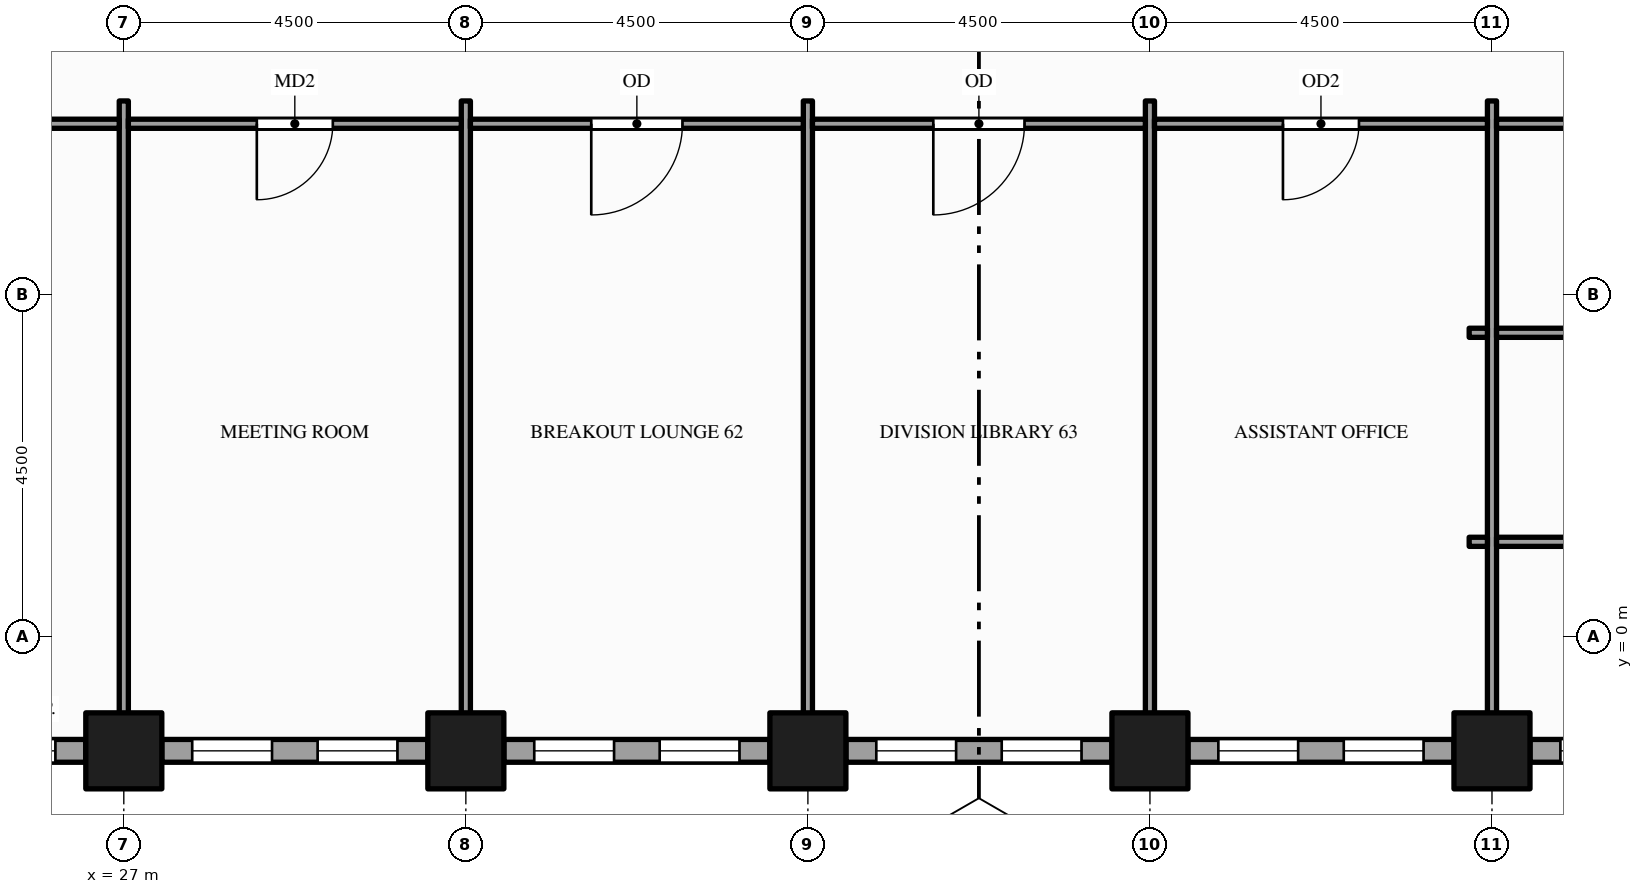
"""IFC4 building model, lengths in metres.
Left out: names, types, materials, properties, quantities, classifications, styles, units other than length and angle.
Written with IfcOpenShell. Run it as: python <this file> out.ifc"""

import sys

from ifc_helpers import new_model, si_unit, direction, frame, frame_2d, origin, origin_2d, place, context, subcontext, project, spatial, rectangle, hollow_rectangle, extrude, element, fill, save


model = new_model("IFC4")
c1 = context("Model", 3, precision=1e-05, world=origin(), true_north=direction((0.0, 1.0)))
c2 = subcontext(c1, "Body", "Model", "MODEL_VIEW")
j1 = project(units=[si_unit("LENGTHUNIT", "METRE"), si_unit("PLANEANGLEUNIT", "RADIAN")], contexts=[c1])
p1 = place(None, origin())
s1 = spatial("IfcSite", under=j1, at=p1, CompositionType="ELEMENT")
p2 = place(p1, origin())
s2 = spatial("IfcBuilding", under=s1, at=p2, CompositionType="ELEMENT")
p3 = place(p2, frame((0.0, 0.0, 103.0)))
s3 = spatial("IfcBuildingStorey", under=s2, at=p3, CompositionType="ELEMENT", Elevation=103.0)
for number, where, z_axis, x_axis in (
    (1, (27.0, -1.5, -0.15), (0.0, 0.0, 1.0), (1.0, 0.0, 0.0)),
    (2, (31.5, -1.5, -0.15), (0.0, 0.0, 1.0), (1.0, 0.0, 0.0)),
    (3, (36.0, -1.5, -0.15), (0.0, 0.0, 1.0), (1.0, 0.0, 0.0)),
    (4, (40.5, -1.5, -0.15), (0.0, 0.0, 1.0), (1.0, 0.0, 0.0)),
    (5, (45.0, -1.5, -0.15), (0.0, 0.0, 1.0), (1.0, 0.0, 0.0)),
):
    element("IfcColumn", number, at=place(p3, frame(where, z_axis=z_axis, x_axis=x_axis)), inside=s3, PredefinedType="COLUMN", context=c2, shape_type="SweptSolid", body=[
        extrude(hollow_rectangle(XDim=1.0, YDim=1.0, WallThickness=0.05, at=origin_2d()), origin(), (0.0, 0.0, 1.0), 4.0),
    ])
p4 = place(p3, frame((23.0, -1.5, 0.0), z_axis=(0.0, 0.0, 1.0), x_axis=(1.0, 0.0, 0.0)))
e6 = element("IfcWall", 6, at=p4, inside=s3, PredefinedType="STANDARD", context=c2, shape_type="SweptSolid", body=[
    extrude(rectangle(XDim=3.5, YDim=0.3, at=frame_2d((1.75, 0.0))), origin(), (0.0, 0.0, 1.0), 3.154),
])
p5 = place(p4, frame((0.4, 0.0, 0.9)))
e7 = element("IfcOpeningElement", 7, at=p5, cuts=e6, PredefinedType="OPENING", context=c2, shape_type="SweptSolid", body=[
    extrude(rectangle(XDim=1.05, YDim=2.0, at=frame_2d((0.525, 1.0))), frame((0.0, 0.16, 0.0), z_axis=(0.0, -1.0, 0.0), x_axis=(1.0, 0.0, 0.0)), (0.0, 0.0, 1.0), 0.32),
])
p6 = place(p4, frame((2.05, 0.0, 0.9)))
e8 = element("IfcOpeningElement", 8, at=p6, cuts=e6, PredefinedType="OPENING", context=c2, shape_type="SweptSolid", body=[
    extrude(rectangle(XDim=1.05, YDim=2.0, at=frame_2d((0.525, 1.0))), frame((0.0, 0.16, 0.0), z_axis=(0.0, -1.0, 0.0), x_axis=(1.0, 0.0, 0.0)), (0.0, 0.0, 1.0), 0.32),
])
p7 = place(p3, frame((27.5, -1.5, 0.0), z_axis=(0.0, 0.0, 1.0), x_axis=(1.0, 0.0, 0.0)))
e9 = element("IfcWall", 9, at=p7, inside=s3, PredefinedType="STANDARD", context=c2, shape_type="SweptSolid", body=[
    extrude(rectangle(XDim=3.5, YDim=0.3, at=frame_2d((1.75, 0.0))), origin(), (0.0, 0.0, 1.0), 3.154),
])
p8 = place(p7, frame((0.4, 0.0, 0.9)))
e10 = element("IfcOpeningElement", 10, at=p8, cuts=e9, PredefinedType="OPENING", context=c2, shape_type="SweptSolid", body=[
    extrude(rectangle(XDim=1.05, YDim=2.0, at=frame_2d((0.525, 1.0))), frame((0.0, 0.16, 0.0), z_axis=(0.0, -1.0, 0.0), x_axis=(1.0, 0.0, 0.0)), (0.0, 0.0, 1.0), 0.32),
])
p9 = place(p7, frame((2.05, 0.0, 0.9)))
e11 = element("IfcOpeningElement", 11, at=p9, cuts=e9, PredefinedType="OPENING", context=c2, shape_type="SweptSolid", body=[
    extrude(rectangle(XDim=1.05, YDim=2.0, at=frame_2d((0.525, 1.0))), frame((0.0, 0.16, 0.0), z_axis=(0.0, -1.0, 0.0), x_axis=(1.0, 0.0, 0.0)), (0.0, 0.0, 1.0), 0.32),
])
p10 = place(p3, frame((32.0, -1.5, 0.0), z_axis=(0.0, 0.0, 1.0), x_axis=(1.0, 0.0, 0.0)))
e12 = element("IfcWall", 12, at=p10, inside=s3, PredefinedType="STANDARD", context=c2, shape_type="SweptSolid", body=[
    extrude(rectangle(XDim=3.5, YDim=0.3, at=frame_2d((1.75, 0.0))), origin(), (0.0, 0.0, 1.0), 3.154),
])
p11 = place(p10, frame((0.4, 0.0, 0.9)))
e13 = element("IfcOpeningElement", 13, at=p11, cuts=e12, PredefinedType="OPENING", context=c2, shape_type="SweptSolid", body=[
    extrude(rectangle(XDim=1.05, YDim=2.0, at=frame_2d((0.525, 1.0))), frame((0.0, 0.16, 0.0), z_axis=(0.0, -1.0, 0.0), x_axis=(1.0, 0.0, 0.0)), (0.0, 0.0, 1.0), 0.32),
])
p12 = place(p10, frame((2.05, 0.0, 0.9)))
e14 = element("IfcOpeningElement", 14, at=p12, cuts=e12, PredefinedType="OPENING", context=c2, shape_type="SweptSolid", body=[
    extrude(rectangle(XDim=1.05, YDim=2.0, at=frame_2d((0.525, 1.0))), frame((0.0, 0.16, 0.0), z_axis=(0.0, -1.0, 0.0), x_axis=(1.0, 0.0, 0.0)), (0.0, 0.0, 1.0), 0.32),
])
p13 = place(p3, frame((36.5, -1.5, 0.0), z_axis=(0.0, 0.0, 1.0), x_axis=(1.0, 0.0, 0.0)))
e15 = element("IfcWall", 15, at=p13, inside=s3, PredefinedType="STANDARD", context=c2, shape_type="SweptSolid", body=[
    extrude(rectangle(XDim=3.5, YDim=0.3, at=frame_2d((1.75, 0.0))), origin(), (0.0, 0.0, 1.0), 3.154),
])
p14 = place(p13, frame((0.4, 0.0, 0.9)))
e16 = element("IfcOpeningElement", 16, at=p14, cuts=e15, PredefinedType="OPENING", context=c2, shape_type="SweptSolid", body=[
    extrude(rectangle(XDim=1.05, YDim=2.0, at=frame_2d((0.525, 1.0))), frame((0.0, 0.16, 0.0), z_axis=(0.0, -1.0, 0.0), x_axis=(1.0, 0.0, 0.0)), (0.0, 0.0, 1.0), 0.32),
])
p15 = place(p13, frame((2.05, 0.0, 0.9)))
e17 = element("IfcOpeningElement", 17, at=p15, cuts=e15, PredefinedType="OPENING", context=c2, shape_type="SweptSolid", body=[
    extrude(rectangle(XDim=1.05, YDim=2.0, at=frame_2d((0.525, 1.0))), frame((0.0, 0.16, 0.0), z_axis=(0.0, -1.0, 0.0), x_axis=(1.0, 0.0, 0.0)), (0.0, 0.0, 1.0), 0.32),
])
p16 = place(p3, frame((41.0, -1.5, 0.0), z_axis=(0.0, 0.0, 1.0), x_axis=(1.0, 0.0, 0.0)))
e18 = element("IfcWall", 18, at=p16, inside=s3, PredefinedType="STANDARD", context=c2, shape_type="SweptSolid", body=[
    extrude(rectangle(XDim=3.5, YDim=0.3, at=frame_2d((1.75, 0.0))), origin(), (0.0, 0.0, 1.0), 3.154),
])
p17 = place(p16, frame((0.4, 0.0, 0.9)))
e19 = element("IfcOpeningElement", 19, at=p17, cuts=e18, PredefinedType="OPENING", context=c2, shape_type="SweptSolid", body=[
    extrude(rectangle(XDim=1.05, YDim=2.0, at=frame_2d((0.525, 1.0))), frame((0.0, 0.16, 0.0), z_axis=(0.0, -1.0, 0.0), x_axis=(1.0, 0.0, 0.0)), (0.0, 0.0, 1.0), 0.32),
])
p18 = place(p16, frame((2.05, 0.0, 0.9)))
e20 = element("IfcOpeningElement", 20, at=p18, cuts=e18, PredefinedType="OPENING", context=c2, shape_type="SweptSolid", body=[
    extrude(rectangle(XDim=1.05, YDim=2.0, at=frame_2d((0.525, 1.0))), frame((0.0, 0.16, 0.0), z_axis=(0.0, -1.0, 0.0), x_axis=(1.0, 0.0, 0.0)), (0.0, 0.0, 1.0), 0.32),
])
p19 = place(p3, frame((45.5, -1.5, 0.0), z_axis=(0.0, 0.0, 1.0), x_axis=(1.0, 0.0, 0.0)))
e21 = element("IfcWall", 21, at=p19, inside=s3, PredefinedType="STANDARD", context=c2, shape_type="SweptSolid", body=[
    extrude(rectangle(XDim=3.5, YDim=0.3, at=frame_2d((1.75, 0.0))), origin(), (0.0, 0.0, 1.0), 3.154),
])
p20 = place(p19, frame((0.4, 0.0, 0.9)))
e22 = element("IfcOpeningElement", 22, at=p20, cuts=e21, PredefinedType="OPENING", context=c2, shape_type="SweptSolid", body=[
    extrude(rectangle(XDim=1.05, YDim=2.0, at=frame_2d((0.525, 1.0))), frame((0.0, 0.16, 0.0), z_axis=(0.0, -1.0, 0.0), x_axis=(1.0, 0.0, 0.0)), (0.0, 0.0, 1.0), 0.32),
])
p21 = place(p19, frame((2.05, 0.0, 0.9)))
e23 = element("IfcOpeningElement", 23, at=p21, cuts=e21, PredefinedType="OPENING", context=c2, shape_type="SweptSolid", body=[
    extrude(rectangle(XDim=1.05, YDim=2.0, at=frame_2d((0.525, 1.0))), frame((0.0, 0.16, 0.0), z_axis=(0.0, -1.0, 0.0), x_axis=(1.0, 0.0, 0.0)), (0.0, 0.0, 1.0), 0.32),
])
for number, where, z_axis, x_axis in (
    (24, (27.0, -1.35, 0.0), (0.0, 0.0, 1.0), (0.0, 1.0, 0.0)),
    (25, (31.5, -1.35, 0.0), (0.0, 0.0, 1.0), (0.0, 1.0, 0.0)),
    (26, (36.0, -1.35, 0.0), (0.0, 0.0, 1.0), (0.0, 1.0, 0.0)),
    (27, (40.5, -1.35, 0.0), (0.0, 0.0, 1.0), (0.0, 1.0, 0.0)),
    (28, (45.0, -1.35, 0.0), (0.0, 0.0, 1.0), (0.0, 1.0, 0.0)),
):
    element("IfcWall", number, at=place(p3, frame(where, z_axis=z_axis, x_axis=x_axis)), inside=s3, PredefinedType="PARTITIONING", context=c2, shape_type="SweptSolid", body=[
        extrude(rectangle(XDim=8.4, YDim=0.12, at=frame_2d((4.2, 0.0))), origin(), (0.0, 0.0, 1.0), 2.938),
    ])
p22 = place(p3, frame((44.7, 1.25, 0.0), z_axis=(0.0, 0.0, 1.0), x_axis=(1.0, 0.0, 0.0)))
e29 = element("IfcWall", 29, at=p22, inside=s3, PredefinedType="PARTITIONING", context=c2, shape_type="SweptSolid", body=[
    extrude(rectangle(XDim=0.24, YDim=0.12, at=frame_2d((0.12, 0.0))), origin(), (0.0, 0.0, 1.0), 2.938),
])
p23 = place(p3, frame((45.06, 1.25, 0.0), z_axis=(0.0, 0.0, 1.0), x_axis=(1.0, 0.0, 0.0)))
e30 = element("IfcWall", 30, at=p23, inside=s3, PredefinedType="PARTITIONING", context=c2, shape_type="SweptSolid", body=[
    extrude(rectangle(XDim=4.38, YDim=0.12, at=frame_2d((2.19, 0.0))), origin(), (0.0, 0.0, 1.0), 2.938),
])
p24 = place(p3, frame((44.7, 4.0, 0.0), z_axis=(0.0, 0.0, 1.0), x_axis=(1.0, 0.0, 0.0)))
e31 = element("IfcWall", 31, at=p24, inside=s3, PredefinedType="PARTITIONING", context=c2, shape_type="SweptSolid", body=[
    extrude(rectangle(XDim=0.24, YDim=0.12, at=frame_2d((0.12, 0.0))), origin(), (0.0, 0.0, 1.0), 2.938),
])
p25 = place(p3, frame((45.06, 4.0, 0.0), z_axis=(0.0, 0.0, 1.0), x_axis=(1.0, 0.0, 0.0)))
e32 = element("IfcWall", 32, at=p25, inside=s3, PredefinedType="PARTITIONING", context=c2, shape_type="SweptSolid", body=[
    extrude(rectangle(XDim=4.38, YDim=0.12, at=frame_2d((2.19, 0.0))), origin(), (0.0, 0.0, 1.0), 2.938),
])
p26 = place(p3, frame((22.56, 6.75, 0.0), z_axis=(0.0, 0.0, 1.0), x_axis=(1.0, 0.0, 0.0)))
e33 = element("IfcWall", 33, at=p26, inside=s3, PredefinedType="PARTITIONING", context=c2, shape_type="SweptSolid", body=[
    extrude(rectangle(XDim=4.38, YDim=0.12, at=frame_2d((2.19, 0.0))), origin(), (0.0, 0.0, 1.0), 2.76),
])
p27 = place(p26, frame((1.69, 0.0, 0.0)))
e34 = element("IfcOpeningElement", 34, at=p27, cuts=e33, PredefinedType="OPENING", context=c2, shape_type="SweptSolid", body=[
    extrude(rectangle(XDim=1.0, YDim=2.1, at=frame_2d((0.5, 1.05))), frame((0.0, 0.07, 0.0), z_axis=(0.0, -1.0, 0.0), x_axis=(1.0, 0.0, 0.0)), (0.0, 0.0, 1.0), 0.14),
])
p28 = place(p3, frame((27.06, 6.75, 0.0), z_axis=(0.0, 0.0, 1.0), x_axis=(1.0, 0.0, 0.0)))
e35 = element("IfcWall", 35, at=p28, inside=s3, PredefinedType="PARTITIONING", context=c2, shape_type="SweptSolid", body=[
    extrude(rectangle(XDim=4.38, YDim=0.12, at=frame_2d((2.19, 0.0))), origin(), (0.0, 0.0, 1.0), 2.938),
])
p29 = place(p28, frame((1.69, 0.0, 0.0)))
e36 = element("IfcOpeningElement", 36, at=p29, cuts=e35, PredefinedType="OPENING", context=c2, shape_type="SweptSolid", body=[
    extrude(rectangle(XDim=1.0, YDim=2.1, at=frame_2d((0.5, 1.05))), frame((0.0, 0.07, 0.0), z_axis=(0.0, -1.0, 0.0), x_axis=(1.0, 0.0, 0.0)), (0.0, 0.0, 1.0), 0.14),
])
p30 = place(p3, frame((31.56, 6.75, 0.0), z_axis=(0.0, 0.0, 1.0), x_axis=(1.0, 0.0, 0.0)))
e37 = element("IfcWall", 37, at=p30, inside=s3, PredefinedType="PARTITIONING", context=c2, shape_type="SweptSolid", body=[
    extrude(rectangle(XDim=4.38, YDim=0.12, at=frame_2d((2.19, 0.0))), origin(), (0.0, 0.0, 1.0), 2.938),
])
p31 = place(p30, frame((1.59, 0.0, 0.0)))
e38 = element("IfcOpeningElement", 38, at=p31, cuts=e37, PredefinedType="OPENING", context=c2, shape_type="SweptSolid", body=[
    extrude(rectangle(XDim=1.2, YDim=2.1, at=frame_2d((0.6, 1.05))), frame((0.0, 0.07, 0.0), z_axis=(0.0, -1.0, 0.0), x_axis=(1.0, 0.0, 0.0)), (0.0, 0.0, 1.0), 0.14),
])
p32 = place(p3, frame((36.06, 6.75, 0.0), z_axis=(0.0, 0.0, 1.0), x_axis=(1.0, 0.0, 0.0)))
e39 = element("IfcWall", 39, at=p32, inside=s3, PredefinedType="PARTITIONING", context=c2, shape_type="SweptSolid", body=[
    extrude(rectangle(XDim=4.38, YDim=0.12, at=frame_2d((2.19, 0.0))), origin(), (0.0, 0.0, 1.0), 2.938),
])
p33 = place(p32, frame((1.59, 0.0, 0.0)))
e40 = element("IfcOpeningElement", 40, at=p33, cuts=e39, PredefinedType="OPENING", context=c2, shape_type="SweptSolid", body=[
    extrude(rectangle(XDim=1.2, YDim=2.1, at=frame_2d((0.6, 1.05))), frame((0.0, 0.07, 0.0), z_axis=(0.0, -1.0, 0.0), x_axis=(1.0, 0.0, 0.0)), (0.0, 0.0, 1.0), 0.14),
])
p34 = place(p3, frame((40.56, 6.75, 0.0), z_axis=(0.0, 0.0, 1.0), x_axis=(1.0, 0.0, 0.0)))
e41 = element("IfcWall", 41, at=p34, inside=s3, PredefinedType="PARTITIONING", context=c2, shape_type="SweptSolid", body=[
    extrude(rectangle(XDim=4.38, YDim=0.12, at=frame_2d((2.19, 0.0))), origin(), (0.0, 0.0, 1.0), 2.938),
])
p35 = place(p34, frame((1.69, 0.0, 0.0)))
e42 = element("IfcOpeningElement", 42, at=p35, cuts=e41, PredefinedType="OPENING", context=c2, shape_type="SweptSolid", body=[
    extrude(rectangle(XDim=1.0, YDim=2.1, at=frame_2d((0.5, 1.05))), frame((0.0, 0.07, 0.0), z_axis=(0.0, -1.0, 0.0), x_axis=(1.0, 0.0, 0.0)), (0.0, 0.0, 1.0), 0.14),
])
p36 = place(p3, frame((45.06, 6.75, 0.0), z_axis=(0.0, 0.0, 1.0), x_axis=(1.0, 0.0, 0.0)))
e43 = element("IfcWall", 43, at=p36, inside=s3, PredefinedType="PARTITIONING", context=c2, shape_type="SweptSolid", body=[
    extrude(rectangle(XDim=4.38, YDim=0.12, at=frame_2d((2.19, 0.0))), origin(), (0.0, 0.0, 1.0), 2.938),
])
p37 = place(p6, origin())
e44 = element("IfcWindow", 44, at=p37, inside=s3, PartitioningType="SINGLE_PANEL", PredefinedType="WINDOW", context=c2, shape_type="SweptSolid", body=[
    extrude(rectangle(XDim=1.05, YDim=2.0, at=frame_2d((0.525, 1.0))), frame((0.0, 0.03, 0.0), z_axis=(0.0, -1.0, 0.0), x_axis=(1.0, 0.0, 0.0)), (0.0, 0.0, 1.0), 0.06),
])
fill(e8, e44)
p38 = place(p8, origin())
e45 = element("IfcWindow", 45, at=p38, inside=s3, PartitioningType="SINGLE_PANEL", PredefinedType="WINDOW", context=c2, shape_type="SweptSolid", body=[
    extrude(rectangle(XDim=1.05, YDim=2.0, at=frame_2d((0.525, 1.0))), frame((0.0, 0.03, 0.0), z_axis=(0.0, -1.0, 0.0), x_axis=(1.0, 0.0, 0.0)), (0.0, 0.0, 1.0), 0.06),
])
fill(e10, e45)
p39 = place(p9, origin())
e46 = element("IfcWindow", 46, at=p39, inside=s3, PartitioningType="SINGLE_PANEL", PredefinedType="WINDOW", context=c2, shape_type="SweptSolid", body=[
    extrude(rectangle(XDim=1.05, YDim=2.0, at=frame_2d((0.525, 1.0))), frame((0.0, 0.03, 0.0), z_axis=(0.0, -1.0, 0.0), x_axis=(1.0, 0.0, 0.0)), (0.0, 0.0, 1.0), 0.06),
])
fill(e11, e46)
p40 = place(p11, origin())
e47 = element("IfcWindow", 47, at=p40, inside=s3, PartitioningType="SINGLE_PANEL", PredefinedType="WINDOW", context=c2, shape_type="SweptSolid", body=[
    extrude(rectangle(XDim=1.05, YDim=2.0, at=frame_2d((0.525, 1.0))), frame((0.0, 0.03, 0.0), z_axis=(0.0, -1.0, 0.0), x_axis=(1.0, 0.0, 0.0)), (0.0, 0.0, 1.0), 0.06),
])
fill(e13, e47)
p41 = place(p12, origin())
e48 = element("IfcWindow", 48, at=p41, inside=s3, PartitioningType="SINGLE_PANEL", PredefinedType="WINDOW", context=c2, shape_type="SweptSolid", body=[
    extrude(rectangle(XDim=1.05, YDim=2.0, at=frame_2d((0.525, 1.0))), frame((0.0, 0.03, 0.0), z_axis=(0.0, -1.0, 0.0), x_axis=(1.0, 0.0, 0.0)), (0.0, 0.0, 1.0), 0.06),
])
fill(e14, e48)
p42 = place(p14, origin())
e49 = element("IfcWindow", 49, at=p42, inside=s3, PartitioningType="SINGLE_PANEL", PredefinedType="WINDOW", context=c2, shape_type="SweptSolid", body=[
    extrude(rectangle(XDim=1.05, YDim=2.0, at=frame_2d((0.525, 1.0))), frame((0.0, 0.03, 0.0), z_axis=(0.0, -1.0, 0.0), x_axis=(1.0, 0.0, 0.0)), (0.0, 0.0, 1.0), 0.06),
])
fill(e16, e49)
p43 = place(p15, origin())
e50 = element("IfcWindow", 50, at=p43, inside=s3, PartitioningType="SINGLE_PANEL", PredefinedType="WINDOW", context=c2, shape_type="SweptSolid", body=[
    extrude(rectangle(XDim=1.05, YDim=2.0, at=frame_2d((0.525, 1.0))), frame((0.0, 0.03, 0.0), z_axis=(0.0, -1.0, 0.0), x_axis=(1.0, 0.0, 0.0)), (0.0, 0.0, 1.0), 0.06),
])
fill(e17, e50)
p44 = place(p17, origin())
e51 = element("IfcWindow", 51, at=p44, inside=s3, PartitioningType="SINGLE_PANEL", PredefinedType="WINDOW", context=c2, shape_type="SweptSolid", body=[
    extrude(rectangle(XDim=1.05, YDim=2.0, at=frame_2d((0.525, 1.0))), frame((0.0, 0.03, 0.0), z_axis=(0.0, -1.0, 0.0), x_axis=(1.0, 0.0, 0.0)), (0.0, 0.0, 1.0), 0.06),
])
fill(e19, e51)
p45 = place(p18, origin())
e52 = element("IfcWindow", 52, at=p45, inside=s3, PartitioningType="SINGLE_PANEL", PredefinedType="WINDOW", context=c2, shape_type="SweptSolid", body=[
    extrude(rectangle(XDim=1.05, YDim=2.0, at=frame_2d((0.525, 1.0))), frame((0.0, 0.03, 0.0), z_axis=(0.0, -1.0, 0.0), x_axis=(1.0, 0.0, 0.0)), (0.0, 0.0, 1.0), 0.06),
])
fill(e20, e52)
p46 = place(p20, origin())
e53 = element("IfcWindow", 53, at=p46, inside=s3, PartitioningType="SINGLE_PANEL", PredefinedType="WINDOW", context=c2, shape_type="SweptSolid", body=[
    extrude(rectangle(XDim=1.05, YDim=2.0, at=frame_2d((0.525, 1.0))), frame((0.0, 0.03, 0.0), z_axis=(0.0, -1.0, 0.0), x_axis=(1.0, 0.0, 0.0)), (0.0, 0.0, 1.0), 0.06),
])
fill(e22, e53)
p47 = place(p29, origin())
e54 = element("IfcDoor", 54, at=p47, inside=s3, OperationType="SINGLE_SWING_LEFT", PredefinedType="DOOR", context=c2, shape_type="SweptSolid", body=[
    extrude(rectangle(XDim=1.0, YDim=2.1, at=frame_2d((0.5, 1.05))), frame((0.0, 0.025, 0.0), z_axis=(0.0, -1.0, 0.0), x_axis=(1.0, 0.0, 0.0)), (0.0, 0.0, 1.0), 0.05),
])
fill(e36, e54)
p48 = place(p31, origin())
e55 = element("IfcDoor", 55, at=p48, inside=s3, OperationType="SINGLE_SWING_LEFT", PredefinedType="DOOR", context=c2, shape_type="SweptSolid", body=[
    extrude(rectangle(XDim=1.2, YDim=2.1, at=frame_2d((0.6, 1.05))), frame((0.0, 0.025, 0.0), z_axis=(0.0, -1.0, 0.0), x_axis=(1.0, 0.0, 0.0)), (0.0, 0.0, 1.0), 0.05),
])
fill(e38, e55)
p49 = place(p33, origin())
e56 = element("IfcDoor", 56, at=p49, inside=s3, OperationType="SINGLE_SWING_LEFT", PredefinedType="DOOR", context=c2, shape_type="SweptSolid", body=[
    extrude(rectangle(XDim=1.2, YDim=2.1, at=frame_2d((0.6, 1.05))), frame((0.0, 0.025, 0.0), z_axis=(0.0, -1.0, 0.0), x_axis=(1.0, 0.0, 0.0)), (0.0, 0.0, 1.0), 0.05),
])
fill(e40, e56)
p50 = place(p35, origin())
e57 = element("IfcDoor", 57, at=p50, inside=s3, OperationType="SINGLE_SWING_LEFT", PredefinedType="DOOR", context=c2, shape_type="SweptSolid", body=[
    extrude(rectangle(XDim=1.0, YDim=2.1, at=frame_2d((0.5, 1.05))), frame((0.0, 0.025, 0.0), z_axis=(0.0, -1.0, 0.0), x_axis=(1.0, 0.0, 0.0)), (0.0, 0.0, 1.0), 0.05),
])
fill(e42, e57)
save(model, sys.argv[1])
